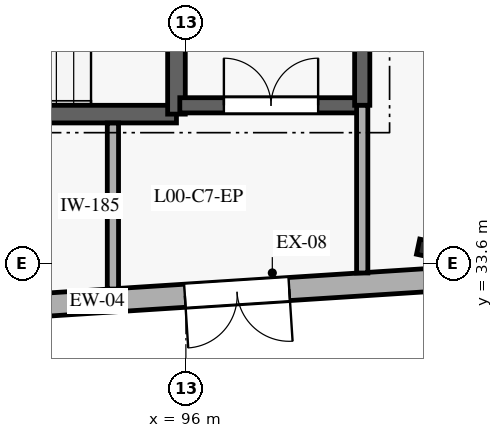
"""IFC4 building model, lengths in metres.
Left out: names, types, materials, properties, quantities, classifications, styles, units other than length and angle.
Written with IfcOpenShell. Run it as: python <this file> out.ifc"""

import sys

from ifc_helpers import new_model, si_unit, direction, frame, frame_2d, origin, origin_2d, place, context, subcontext, project, spatial, rectangle, i_section, extrude, element, fill, save


model = new_model("IFC4")
c1 = context("Model", 3, precision=1e-05, world=origin(), true_north=direction((0.0, 1.0)))
c2 = subcontext(c1, "Body", "Model", "MODEL_VIEW")
j1 = project(units=[si_unit("LENGTHUNIT", "METRE"), si_unit("PLANEANGLEUNIT", "RADIAN")], contexts=[c1])
p1 = place(None, origin())
s1 = spatial("IfcSite", under=j1, at=p1, CompositionType="ELEMENT")
p2 = place(p1, origin())
s2 = spatial("IfcBuilding", under=s1, at=p2, CompositionType="ELEMENT")
p3 = place(p2, origin())
s3 = spatial("IfcBuildingStorey", under=s2, at=p3, CompositionType="ELEMENT", Elevation=0.0)
p4 = place(p3, frame((99.944, 33.848, 0.0), z_axis=(0.0, 0.0, 1.0), x_axis=(0.978364788978, -0.206887263232, 0.0)))
e1 = element("IfcColumn", 1, at=p4, inside=s3, PredefinedType="COLUMN", context=c2, shape_type="SweptSolid", body=[
    extrude(i_section(OverallWidth=0.255, OverallDepth=0.254, WebThickness=0.009, FlangeThickness=0.014, FilletRadius=0.013, at=origin_2d()), origin(), (0.0, 0.0, 1.0), 4.2),
])
p5 = place(p3, frame((100.441, 33.355, 0.0), z_axis=(0.0, 0.0, 1.0), x_axis=(-0.997933226296, -0.064259441753, 0.0)))
e2 = element("IfcWall", 2, at=p5, inside=s3, PredefinedType="SOLIDWALL", context=c2, shape_type="SweptSolid", body=[
    extrude(rectangle(XDim=7.215, YDim=0.38, at=frame_2d((3.607, 0.0))), origin(), (0.0, 0.0, 1.0), 3.94),
])
p6 = place(p5, frame((2.747, 0.0, 0.0)))
e3 = element("IfcOpeningElement", 3, at=p6, cuts=e2, PredefinedType="OPENING", context=c2, shape_type="SweptSolid", body=[
    extrude(rectangle(XDim=1.72, YDim=2.15, at=frame_2d((0.86, 1.075))), frame((0.0, 0.2, 0.0), z_axis=(0.0, -1.0, 0.0), x_axis=(1.0, 0.0, 0.0)), (0.0, 0.0, 1.0), 0.4),
])
p7 = place(p3, frame((89.055, 36.055, 0.0), z_axis=(0.0, 0.0, 1.0), x_axis=(1.0, 0.0, 0.0)))
e4 = element("IfcWall", 4, at=p7, inside=s3, PredefinedType="SHEAR", context=c2, shape_type="SweptSolid", body=[
    extrude(rectangle(XDim=6.79, YDim=0.29, at=frame_2d((3.395, 0.0))), origin(), (0.0, 0.0, 1.0), 3.95),
])
p8 = place(p3, frame((95.845, 36.055, 0.0), z_axis=(0.0, 0.0, 1.0), x_axis=(0.0, 1.0, 0.0)))
e5 = element("IfcWall", 5, at=p8, inside=s3, PredefinedType="SHEAR", context=c2, shape_type="SweptSolid", body=[
    extrude(rectangle(XDim=6.09, YDim=0.29, at=frame_2d((3.045, 0.0))), origin(), (0.0, 0.0, 1.0), 3.95),
])
p9 = place(p8, frame((2.47, 0.0, 0.0)))
e6 = element("IfcOpeningElement", 6, at=p9, cuts=e5, PredefinedType="OPENING", context=c2, shape_type="SweptSolid", body=[
    extrude(rectangle(XDim=1.15, YDim=2.1, at=frame_2d((0.575, 1.05))), frame((0.0, 0.155, 0.0), z_axis=(0.0, -1.0, 0.0), x_axis=(1.0, 0.0, 0.0)), (0.0, 0.0, 1.0), 0.31),
])
p10 = place(p3, frame((95.9, 36.2, 0.0), z_axis=(0.0, 0.0, 1.0), x_axis=(1.0, 0.0, 0.0)))
e7 = element("IfcWall", 7, at=p10, inside=s3, PredefinedType="SHEAR", context=c2, shape_type="SweptSolid", body=[
    extrude(rectangle(XDim=3.0, YDim=0.25, at=frame_2d((1.5, 0.0))), origin(), (0.0, 0.0, 1.0), 3.95),
])
p11 = place(p10, frame((0.725, 0.0, 0.0)))
e8 = element("IfcOpeningElement", 8, at=p11, cuts=e7, PredefinedType="OPENING", context=c2, shape_type="SweptSolid", body=[
    extrude(rectangle(XDim=1.55, YDim=2.15, at=frame_2d((0.775, 1.075))), frame((0.0, 0.135, 0.0), z_axis=(0.0, -1.0, 0.0), x_axis=(1.0, 0.0, 0.0)), (0.0, 0.0, 1.0), 0.27),
])
p12 = place(p3, frame((98.9, 36.2, 0.0), z_axis=(0.0, 0.0, 1.0), x_axis=(0.0, 1.0, 0.0)))
e9 = element("IfcWall", 9, at=p12, inside=s3, PredefinedType="SHEAR", context=c2, shape_type="SweptSolid", body=[
    extrude(rectangle(XDim=5.8, YDim=0.25, at=frame_2d((2.9, 0.0))), origin(), (0.0, 0.0, 1.0), 3.95),
])
p13 = place(p12, frame((2.125, 0.0, 0.0)))
e10 = element("IfcOpeningElement", 10, at=p13, cuts=e9, PredefinedType="OPENING", context=c2, shape_type="SweptSolid", body=[
    extrude(rectangle(XDim=1.55, YDim=2.15, at=frame_2d((0.775, 1.075))), frame((0.0, 0.135, 0.0), z_axis=(0.0, -1.0, 0.0), x_axis=(1.0, 0.0, 0.0)), (0.0, 0.0, 1.0), 0.27),
])
p14 = place(p3, frame((98.9, 33.442, 0.0), z_axis=(0.0, 0.0, 1.0), x_axis=(0.0, 1.0, 0.0)))
e11 = element("IfcWall", 11, at=p14, inside=s3, PredefinedType="PARTITIONING", context=c2, shape_type="SweptSolid", body=[
    extrude(rectangle(XDim=2.757, YDim=0.185, at=frame_2d((1.378, 0.0))), origin(), (0.0, 0.0, 1.0), 3.94),
])
p15 = place(p3, frame((94.8, 35.908, 0.0), z_axis=(0.0, 0.0, 1.0), x_axis=(0.0, -1.0, 0.0)))
e12 = element("IfcWall", 12, at=p15, inside=s3, PredefinedType="PARTITIONING", context=c2, shape_type="SweptSolid", body=[
    extrude(rectangle(XDim=2.73, YDim=0.185, at=frame_2d((1.365, 0.0))), origin(), (0.0, 0.0, 1.0), 3.94),
])
p16 = place(p6, origin())
e13 = element("IfcDoor", 13, at=p16, inside=s3, OperationType="DOUBLE_DOOR_SINGLE_SWING", PredefinedType="DOOR", context=c2, shape_type="SweptSolid", body=[
    extrude(rectangle(XDim=1.72, YDim=2.15, at=frame_2d((0.86, 1.075))), frame((0.0, 0.025, 0.0), z_axis=(0.0, -1.0, 0.0), x_axis=(1.0, 0.0, 0.0)), (0.0, 0.0, 1.0), 0.05),
])
fill(e3, e13)
p17 = place(p11, frame((1.55, 0.0, 0.0), z_axis=(0.0, 0.0, 1.0), x_axis=(-1.0, 0.0, 0.0)))
e14 = element("IfcDoor", 14, at=p17, inside=s3, OperationType="DOUBLE_DOOR_SINGLE_SWING", PredefinedType="DOOR", context=c2, shape_type="SweptSolid", body=[
    extrude(rectangle(XDim=1.55, YDim=2.15, at=frame_2d((0.775, 1.075))), frame((0.0, 0.025, 0.0), z_axis=(0.0, -1.0, 0.0), x_axis=(1.0, 0.0, 0.0)), (0.0, 0.0, 1.0), 0.05),
])
fill(e8, e14)
save(model, sys.argv[1])
